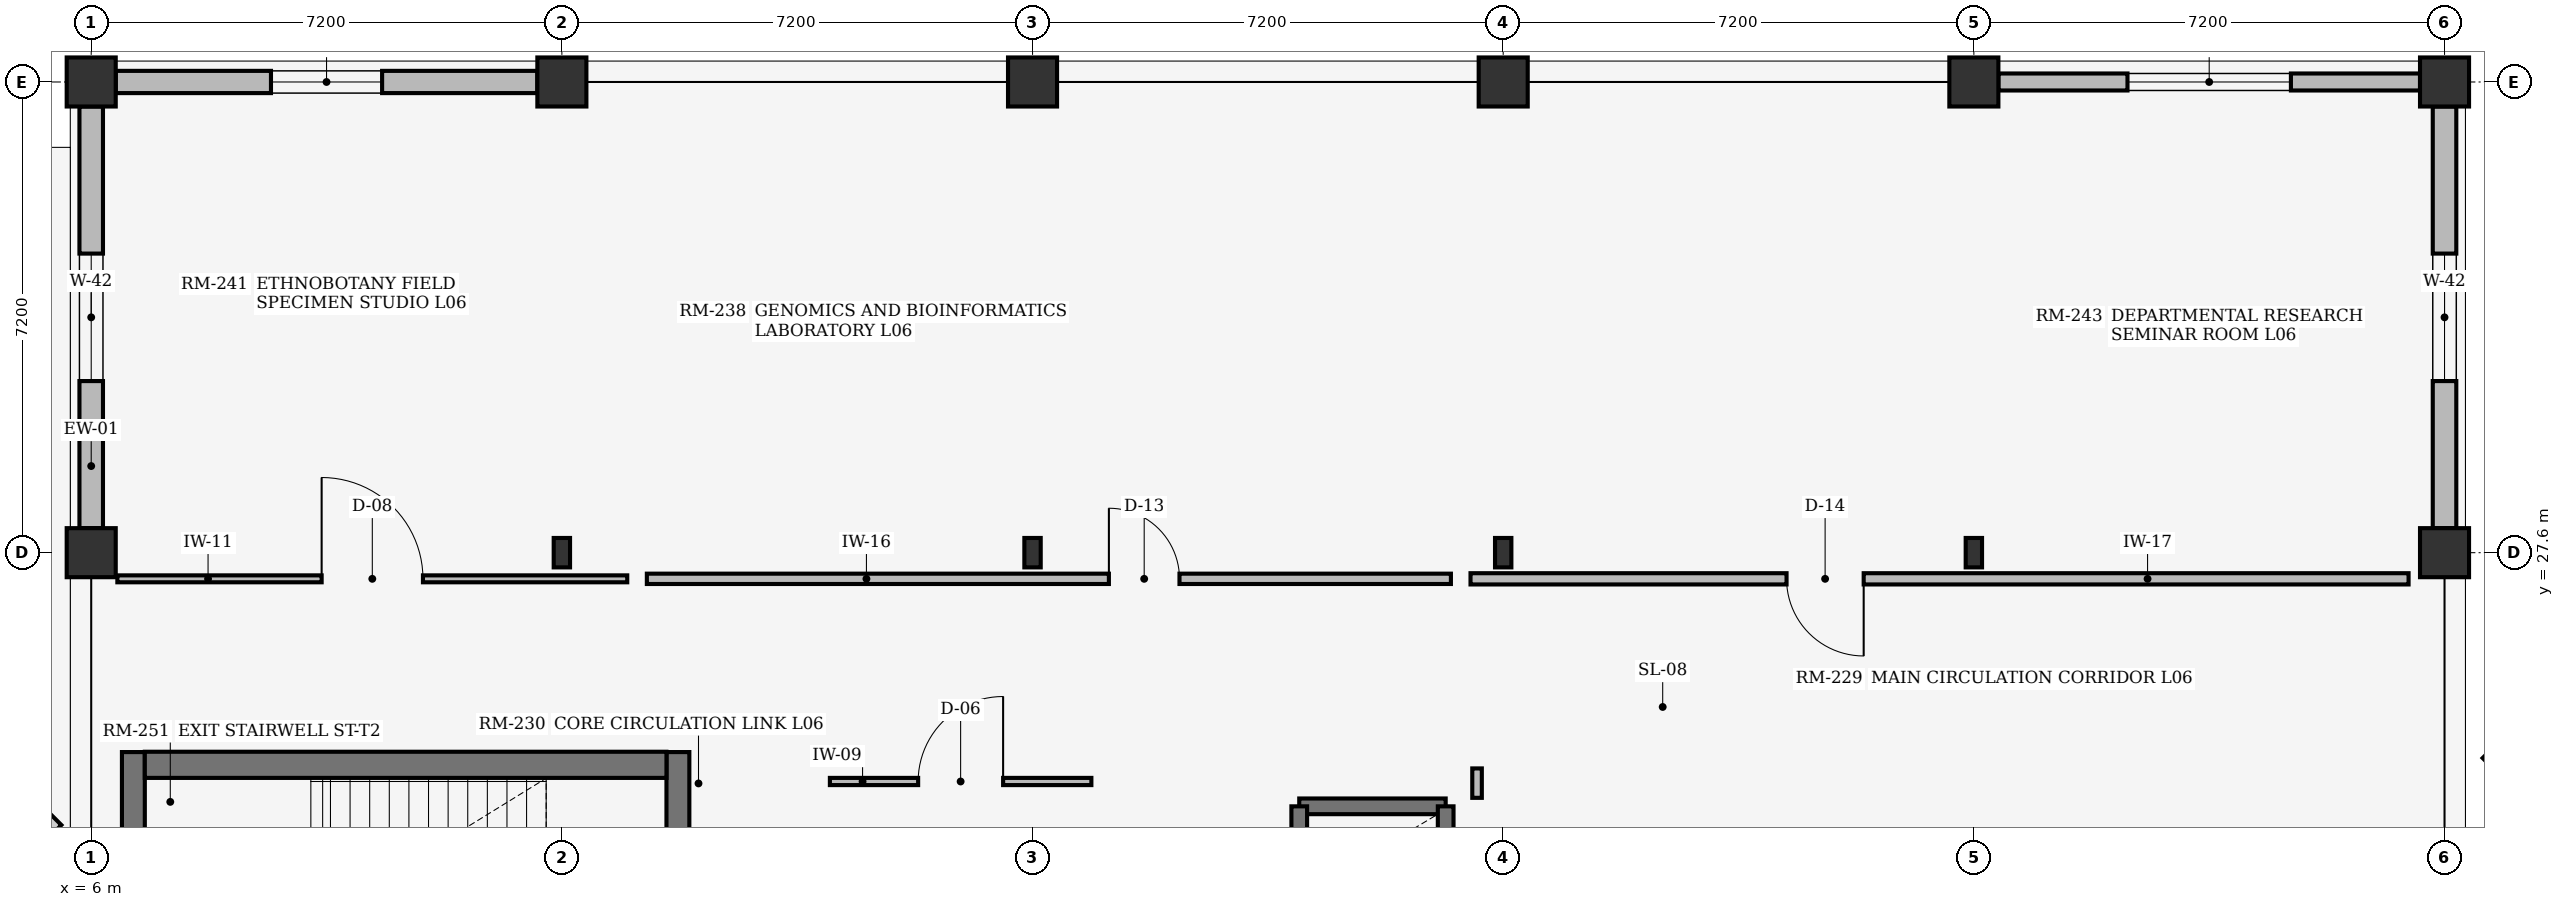
"""IFC4 building model, lengths in metres.
Left out: names, types, materials, properties, quantities, classifications, styles, units other than length and angle.
Written with IfcOpenShell. Run it as: python <this file> out.ifc"""

import sys

from ifc_helpers import new_model, si_unit, direction, frame, frame_2d, origin, origin_2d, place, context, subcontext, project, spatial, rectangle, i_section, extrude, element, fill, save


model = new_model("IFC4")
c1 = context("Model", 3, precision=1e-05, world=origin(), true_north=direction((0.0, 1.0)))
c2 = subcontext(c1, "Body", "Model", "MODEL_VIEW")
j1 = project(units=[si_unit("LENGTHUNIT", "METRE"), si_unit("PLANEANGLEUNIT", "RADIAN")], contexts=[c1])
p1 = place(None, origin())
s1 = spatial("IfcSite", under=j1, at=p1, CompositionType="ELEMENT")
p2 = place(p1, origin())
s2 = spatial("IfcBuilding", under=s1, at=p2, CompositionType="ELEMENT")
p3 = place(p2, frame((0.0, 0.0, 24.9)))
s3 = spatial("IfcBuildingStorey", under=s2, at=p3, CompositionType="ELEMENT", Elevation=24.9)
for number, where, z_axis, x_axis in (
    (1, (6.0, 27.6, 0.0), (0.0, 0.0, 1.0), (1.0, 0.0, 0.0)),
    (2, (6.0, 34.8, 0.0), (0.0, 0.0, 1.0), (1.0, 0.0, 0.0)),
):
    element("IfcColumn", number, at=place(p3, frame(where, z_axis=z_axis, x_axis=x_axis)), inside=s3, PredefinedType="COLUMN", context=c2, shape_type="SweptSolid", body=[
        extrude(rectangle(XDim=0.75, YDim=0.75, at=origin_2d()), origin(), (0.0, 0.0, 1.0), 3.65),
    ])
p4 = place(p3, frame((13.2, 27.6, 0.0), z_axis=(0.0, 0.0, 1.0), x_axis=(1.0, 0.0, 0.0)))
e3 = element("IfcColumn", 3, at=p4, inside=s3, PredefinedType="COLUMN", context=c2, shape_type="SweptSolid", body=[
    extrude(i_section(OverallWidth=0.25, OverallDepth=0.45, WebThickness=0.011, FlangeThickness=0.014, at=origin_2d()), origin(), (0.0, 0.0, 1.0), 3.65),
])
p5 = place(p3, frame((13.2, 34.8, 0.0), z_axis=(0.0, 0.0, 1.0), x_axis=(1.0, 0.0, 0.0)))
e4 = element("IfcColumn", 4, at=p5, inside=s3, PredefinedType="COLUMN", context=c2, shape_type="SweptSolid", body=[
    extrude(rectangle(XDim=0.75, YDim=0.75, at=origin_2d()), origin(), (0.0, 0.0, 1.0), 3.65),
])
p6 = place(p3, frame((20.4, 27.6, 0.0), z_axis=(0.0, 0.0, 1.0), x_axis=(1.0, 0.0, 0.0)))
e5 = element("IfcColumn", 5, at=p6, inside=s3, PredefinedType="COLUMN", context=c2, shape_type="SweptSolid", body=[
    extrude(i_section(OverallWidth=0.25, OverallDepth=0.45, WebThickness=0.011, FlangeThickness=0.014, at=origin_2d()), origin(), (0.0, 0.0, 1.0), 3.65),
])
p7 = place(p3, frame((20.4, 34.8, 0.0), z_axis=(0.0, 0.0, 1.0), x_axis=(1.0, 0.0, 0.0)))
e6 = element("IfcColumn", 6, at=p7, inside=s3, PredefinedType="COLUMN", context=c2, shape_type="SweptSolid", body=[
    extrude(rectangle(XDim=0.75, YDim=0.75, at=origin_2d()), origin(), (0.0, 0.0, 1.0), 3.65),
])
p8 = place(p3, frame((27.6, 27.6, 0.0), z_axis=(0.0, 0.0, 1.0), x_axis=(1.0, 0.0, 0.0)))
e7 = element("IfcColumn", 7, at=p8, inside=s3, PredefinedType="COLUMN", context=c2, shape_type="SweptSolid", body=[
    extrude(i_section(OverallWidth=0.25, OverallDepth=0.45, WebThickness=0.011, FlangeThickness=0.014, at=origin_2d()), origin(), (0.0, 0.0, 1.0), 3.65),
])
p9 = place(p3, frame((27.6, 34.8, 0.0), z_axis=(0.0, 0.0, 1.0), x_axis=(1.0, 0.0, 0.0)))
e8 = element("IfcColumn", 8, at=p9, inside=s3, PredefinedType="COLUMN", context=c2, shape_type="SweptSolid", body=[
    extrude(rectangle(XDim=0.75, YDim=0.75, at=origin_2d()), origin(), (0.0, 0.0, 1.0), 3.65),
])
p10 = place(p3, frame((34.8, 27.6, 0.0), z_axis=(0.0, 0.0, 1.0), x_axis=(1.0, 0.0, 0.0)))
e9 = element("IfcColumn", 9, at=p10, inside=s3, PredefinedType="COLUMN", context=c2, shape_type="SweptSolid", body=[
    extrude(i_section(OverallWidth=0.25, OverallDepth=0.45, WebThickness=0.011, FlangeThickness=0.014, at=origin_2d()), origin(), (0.0, 0.0, 1.0), 3.65),
])
for number, where, z_axis, x_axis in (
    (10, (34.8, 34.8, 0.0), (0.0, 0.0, 1.0), (1.0, 0.0, 0.0)),
    (11, (42.0, 27.6, 0.0), (0.0, 0.0, 1.0), (1.0, 0.0, 0.0)),
    (12, (42.0, 34.8, 0.0), (0.0, 0.0, 1.0), (1.0, 0.0, 0.0)),
):
    element("IfcColumn", number, at=place(p3, frame(where, z_axis=z_axis, x_axis=x_axis)), inside=s3, PredefinedType="COLUMN", context=c2, shape_type="SweptSolid", body=[
        extrude(rectangle(XDim=0.75, YDim=0.75, at=origin_2d()), origin(), (0.0, 0.0, 1.0), 3.65),
    ])
p11 = place(p3, frame((6.375, 34.8, 0.0), z_axis=(0.0, 0.0, 1.0), x_axis=(1.0, 0.0, 0.0)))
e13 = element("IfcWall", 13, at=p11, inside=s3, PredefinedType="STANDARD", context=c2, shape_type="SweptSolid", body=[
    extrude(rectangle(XDim=6.45, YDim=0.34, at=frame_2d((3.225, 0.0))), origin(), (0.0, 0.0, 1.0), 3.13),
])
p12 = place(p11, frame((2.375, 0.0, 0.75)))
e14 = element("IfcOpeningElement", 14, at=p12, cuts=e13, PredefinedType="OPENING", context=c2, shape_type="SweptSolid", body=[
    extrude(rectangle(XDim=1.7, YDim=1.35, at=frame_2d((0.85, 0.675))), frame((0.0, 0.18, 0.0), z_axis=(0.0, -1.0, 0.0), x_axis=(1.0, 0.0, 0.0)), (0.0, 0.0, 1.0), 0.36),
])
p13 = place(p3, frame((35.175, 34.8, 0.0), z_axis=(0.0, 0.0, 1.0), x_axis=(1.0, 0.0, 0.0)))
e15 = element("IfcWall", 15, at=p13, inside=s3, PredefinedType="STANDARD", context=c2, shape_type="SweptSolid", body=[
    extrude(rectangle(XDim=6.45, YDim=0.26, at=frame_2d((3.225, 0.0))), origin(), (0.0, 0.0, 1.0), 3.13),
])
p14 = place(p13, frame((1.975, 0.0, 0.75)))
e16 = element("IfcOpeningElement", 16, at=p14, cuts=e15, PredefinedType="OPENING", context=c2, shape_type="SweptSolid", body=[
    extrude(rectangle(XDim=2.5, YDim=1.35, at=frame_2d((1.25, 0.675))), frame((0.0, 0.14, 0.0), z_axis=(0.0, -1.0, 0.0), x_axis=(1.0, 0.0, 0.0)), (0.0, 0.0, 1.0), 0.28),
])
p15 = place(p3, frame((6.0, 27.975, 0.0), z_axis=(0.0, 0.0, 1.0), x_axis=(0.0, 1.0, 0.0)))
e17 = element("IfcWall", 17, at=p15, inside=s3, PredefinedType="STANDARD", context=c2, shape_type="SweptSolid", body=[
    extrude(rectangle(XDim=6.45, YDim=0.36, at=frame_2d((3.225, 0.0))), origin(), (0.0, 0.0, 1.0), 3.13),
])
p16 = place(p15, frame((2.25, 0.0, 0.75)))
e18 = element("IfcOpeningElement", 18, at=p16, cuts=e17, PredefinedType="OPENING", context=c2, shape_type="SweptSolid", body=[
    extrude(rectangle(XDim=1.95, YDim=1.5, at=frame_2d((0.975, 0.75))), frame((0.0, 0.19, 0.0), z_axis=(0.0, -1.0, 0.0), x_axis=(1.0, 0.0, 0.0)), (0.0, 0.0, 1.0), 0.38),
])
p17 = place(p3, frame((42.0, 27.975, 0.0), z_axis=(0.0, 0.0, 1.0), x_axis=(0.0, 1.0, 0.0)))
e19 = element("IfcWall", 19, at=p17, inside=s3, PredefinedType="STANDARD", context=c2, shape_type="SweptSolid", body=[
    extrude(rectangle(XDim=6.45, YDim=0.36, at=frame_2d((3.225, 0.0))), origin(), (0.0, 0.0, 1.0), 3.13),
])
p18 = place(p17, frame((2.25, 0.0, 0.75)))
e20 = element("IfcOpeningElement", 20, at=p18, cuts=e19, PredefinedType="OPENING", context=c2, shape_type="SweptSolid", body=[
    extrude(rectangle(XDim=1.95, YDim=1.5, at=frame_2d((0.975, 0.75))), frame((0.0, 0.19, 0.0), z_axis=(0.0, -1.0, 0.0), x_axis=(1.0, 0.0, 0.0)), (0.0, 0.0, 1.0), 0.38),
])
p19 = place(p3, frame((14.975, 24.55, 0.0), z_axis=(0.0, 0.0, 1.0), x_axis=(0.0, -1.0, 0.0)))
e21 = element("IfcWall", 21, at=p19, inside=s3, PredefinedType="SHEAR", context=c2, shape_type="SweptSolid", body=[
    extrude(rectangle(XDim=4.59, YDim=0.35, at=frame_2d((2.295, 0.0))), origin(), (0.0, 0.0, 1.0), 3.65),
])
p20 = place(p19, frame((1.72, 0.0, 0.0)))
e22 = element("IfcOpeningElement", 22, at=p20, cuts=e21, PredefinedType="OPENING", context=c2, shape_type="SweptSolid", body=[
    extrude(rectangle(XDim=1.15, YDim=2.2, at=frame_2d((0.575, 1.1))), frame((0.0, 0.185, 0.0), z_axis=(0.0, -1.0, 0.0), x_axis=(1.0, 0.0, 0.0)), (0.0, 0.0, 1.0), 0.37),
])
p21 = place(p3, frame((6.645, 24.55, 0.0), z_axis=(0.0, 0.0, 1.0), x_axis=(0.0, -1.0, 0.0)))
e23 = element("IfcWall", 23, at=p21, inside=s3, PredefinedType="SHEAR", context=c2, shape_type="SweptSolid", body=[
    extrude(rectangle(XDim=4.59, YDim=0.35, at=frame_2d((2.295, 0.0))), origin(), (0.0, 0.0, 1.0), 3.65),
])
p22 = place(p3, frame((14.8, 24.355, 0.0), z_axis=(0.0, 0.0, 1.0), x_axis=(-1.0, 0.0, 0.0)))
e24 = element("IfcWall", 24, at=p22, inside=s3, PredefinedType="SHEAR", context=c2, shape_type="SweptSolid", body=[
    extrude(rectangle(XDim=7.98, YDim=0.4, at=frame_2d((3.99, 0.0))), origin(), (0.0, 0.0, 1.0), 3.65),
])
p23 = place(p3, frame((24.48, 23.72, 0.0), z_axis=(0.0, 0.0, 1.0), x_axis=(1.0, 0.0, 0.0)))
e25 = element("IfcWall", 25, at=p23, inside=s3, PredefinedType="SHEAR", context=c2, shape_type="SweptSolid", body=[
    extrude(rectangle(XDim=2.24, YDim=0.24, at=frame_2d((1.12, 0.0))), origin(), (0.0, 0.0, 1.0), 3.65),
])
for number, where, z_axis, x_axis in (
    (26, (24.48, 20.78, 0.0), (0.0, 0.0, 1.0), (0.0, 1.0, 0.0)),
    (27, (26.72, 20.78, 0.0), (0.0, 0.0, 1.0), (0.0, 1.0, 0.0)),
):
    element("IfcWall", number, at=place(p3, frame(where, z_axis=z_axis, x_axis=x_axis)), inside=s3, PredefinedType="SHEAR", context=c2, shape_type="SweptSolid", body=[
        extrude(rectangle(XDim=2.94, YDim=0.24, at=frame_2d((1.47, 0.0))), origin(), (0.0, 0.0, 1.0), 3.65),
    ])
p24 = place(p3, frame((17.3, 24.1, 0.0), z_axis=(0.0, 0.0, 1.0), x_axis=(1.0, 0.0, 0.0)))
e28 = element("IfcWall", 28, at=p24, inside=s3, PredefinedType="PARTITIONING", context=c2, shape_type="SweptSolid", body=[
    extrude(rectangle(XDim=4.0, YDim=0.11, at=frame_2d((2.0, 0.0))), origin(), (0.0, 0.0, 1.0), 3.63),
])
p25 = place(p24, frame((1.35, 0.0, 0.0)))
e29 = element("IfcOpeningElement", 29, at=p25, cuts=e28, PredefinedType="OPENING", context=c2, shape_type="SweptSolid", body=[
    extrude(rectangle(XDim=1.3, YDim=2.2, at=frame_2d((0.65, 1.1))), frame((0.0, 0.065, 0.0), z_axis=(0.0, -1.0, 0.0), x_axis=(1.0, 0.0, 0.0)), (0.0, 0.0, 1.0), 0.13),
])
p26 = place(p3, frame((6.4, 27.2, 0.0), z_axis=(0.0, 0.0, 1.0), x_axis=(1.0, 0.0, 0.0)))
e30 = element("IfcWall", 30, at=p26, inside=s3, PredefinedType="PARTITIONING", context=c2, shape_type="SweptSolid", body=[
    extrude(rectangle(XDim=7.8, YDim=0.106, at=frame_2d((3.9, 0.0))), origin(), (0.0, 0.0, 1.0), 3.63),
])
p27 = place(p26, frame((3.125, 0.0, 0.0)))
e31 = element("IfcOpeningElement", 31, at=p27, cuts=e30, PredefinedType="OPENING", context=c2, shape_type="SweptSolid", body=[
    extrude(rectangle(XDim=1.55, YDim=2.25, at=frame_2d((0.775, 1.125))), frame((0.0, 0.063, 0.0), z_axis=(0.0, -1.0, 0.0), x_axis=(1.0, 0.0, 0.0)), (0.0, 0.0, 1.0), 0.126),
])
p28 = place(p3, frame((27.2, 24.3, 0.0), z_axis=(0.0, 0.0, 1.0), x_axis=(0.0, -1.0, 0.0)))
e32 = element("IfcWall", 32, at=p28, inside=s3, PredefinedType="PARTITIONING", context=c2, shape_type="SweptSolid", body=[
    extrude(rectangle(XDim=0.45, YDim=0.146, at=frame_2d((0.225, 0.0))), origin(), (0.0, 0.0, 1.0), 3.63),
])
p29 = place(p3, frame((14.5, 27.2, 0.0), z_axis=(0.0, 0.0, 1.0), x_axis=(1.0, 0.0, 0.0)))
e33 = element("IfcWall", 33, at=p29, inside=s3, PredefinedType="PARTITIONING", context=c2, shape_type="SweptSolid", body=[
    extrude(rectangle(XDim=12.3, YDim=0.158, at=frame_2d((6.15, 0.0))), origin(), (0.0, 0.0, 1.0), 3.63),
])
p30 = place(p29, frame((7.068, 0.0, 0.0)))
e34 = element("IfcOpeningElement", 34, at=p30, cuts=e33, PredefinedType="OPENING", context=c2, shape_type="SweptSolid", body=[
    extrude(rectangle(XDim=1.08, YDim=2.1, at=frame_2d((0.54, 1.05))), frame((0.0, 0.089, 0.0), z_axis=(0.0, -1.0, 0.0), x_axis=(1.0, 0.0, 0.0)), (0.0, 0.0, 1.0), 0.178),
])
p31 = place(p3, frame((27.1, 27.2, 0.0), z_axis=(0.0, 0.0, 1.0), x_axis=(1.0, 0.0, 0.0)))
e35 = element("IfcWall", 35, at=p31, inside=s3, PredefinedType="PARTITIONING", context=c2, shape_type="SweptSolid", body=[
    extrude(rectangle(XDim=14.35, YDim=0.172, at=frame_2d((7.175, 0.0))), origin(), (0.0, 0.0, 1.0), 3.63),
])
p32 = place(p31, frame((4.834, 0.0, 0.0)))
e36 = element("IfcOpeningElement", 36, at=p32, cuts=e35, PredefinedType="OPENING", context=c2, shape_type="SweptSolid", body=[
    extrude(rectangle(XDim=1.18, YDim=2.1, at=frame_2d((0.59, 1.05))), frame((0.0, 0.096, 0.0), z_axis=(0.0, -1.0, 0.0), x_axis=(1.0, 0.0, 0.0)), (0.0, 0.0, 1.0), 0.192),
])
p33 = place(p12, origin())
e37 = element("IfcWindow", 37, at=p33, inside=s3, PartitioningType="SINGLE_PANEL", PredefinedType="WINDOW", context=c2, shape_type="SweptSolid", body=[
    extrude(rectangle(XDim=1.7, YDim=1.35, at=frame_2d((0.85, 0.675))), frame((0.0, 0.03, 0.0), z_axis=(0.0, -1.0, 0.0), x_axis=(1.0, 0.0, 0.0)), (0.0, 0.0, 1.0), 0.06),
])
fill(e14, e37)
p34 = place(p14, origin())
e38 = element("IfcWindow", 38, at=p34, inside=s3, PartitioningType="SINGLE_PANEL", PredefinedType="WINDOW", context=c2, shape_type="SweptSolid", body=[
    extrude(rectangle(XDim=2.5, YDim=1.35, at=frame_2d((1.25, 0.675))), frame((0.0, 0.03, 0.0), z_axis=(0.0, -1.0, 0.0), x_axis=(1.0, 0.0, 0.0)), (0.0, 0.0, 1.0), 0.06),
])
fill(e16, e38)
p35 = place(p16, origin())
e39 = element("IfcWindow", 39, at=p35, inside=s3, PartitioningType="SINGLE_PANEL", PredefinedType="WINDOW", context=c2, shape_type="SweptSolid", body=[
    extrude(rectangle(XDim=1.95, YDim=1.5, at=frame_2d((0.975, 0.75))), frame((0.0, 0.03, 0.0), z_axis=(0.0, -1.0, 0.0), x_axis=(1.0, 0.0, 0.0)), (0.0, 0.0, 1.0), 0.06),
])
fill(e18, e39)
p36 = place(p18, origin())
e40 = element("IfcWindow", 40, at=p36, inside=s3, PartitioningType="SINGLE_PANEL", PredefinedType="WINDOW", context=c2, shape_type="SweptSolid", body=[
    extrude(rectangle(XDim=1.95, YDim=1.5, at=frame_2d((0.975, 0.75))), frame((0.0, 0.03, 0.0), z_axis=(0.0, -1.0, 0.0), x_axis=(1.0, 0.0, 0.0)), (0.0, 0.0, 1.0), 0.06),
])
fill(e20, e40)
p37 = place(p25, frame((1.3, 0.0, 0.0), z_axis=(0.0, 0.0, 1.0), x_axis=(-1.0, 0.0, 0.0)))
e41 = element("IfcDoor", 41, at=p37, inside=s3, OperationType="SINGLE_SWING_RIGHT", PredefinedType="DOOR", context=c2, shape_type="SweptSolid", body=[
    extrude(rectangle(XDim=1.3, YDim=2.2, at=frame_2d((0.65, 1.1))), frame((0.0, 0.025, 0.0), z_axis=(0.0, -1.0, 0.0), x_axis=(1.0, 0.0, 0.0)), (0.0, 0.0, 1.0), 0.05),
])
fill(e29, e41)
p38 = place(p27, origin())
e42 = element("IfcDoor", 42, at=p38, inside=s3, OperationType="DOUBLE_DOOR_SINGLE_SWING", PredefinedType="DOOR", context=c2, shape_type="SweptSolid", body=[
    extrude(rectangle(XDim=1.55, YDim=2.25, at=frame_2d((0.775, 1.125))), frame((0.0, 0.025, 0.0), z_axis=(0.0, -1.0, 0.0), x_axis=(1.0, 0.0, 0.0)), (0.0, 0.0, 1.0), 0.05),
])
fill(e31, e42)
p39 = place(p30, origin())
e43 = element("IfcDoor", 43, at=p39, inside=s3, OperationType="SINGLE_SWING_LEFT", PredefinedType="DOOR", context=c2, shape_type="SweptSolid", body=[
    extrude(rectangle(XDim=1.08, YDim=2.1, at=frame_2d((0.54, 1.05))), frame((0.0, 0.025, 0.0), z_axis=(0.0, -1.0, 0.0), x_axis=(1.0, 0.0, 0.0)), (0.0, 0.0, 1.0), 0.05),
])
fill(e34, e43)
p40 = place(p32, origin())
e44 = element("IfcDoor", 44, at=p40, inside=s3, OperationType="SINGLE_SWING_RIGHT", PredefinedType="DOOR", context=c2, shape_type="SweptSolid", body=[
    extrude(rectangle(XDim=1.18, YDim=2.1, at=frame_2d((0.59, 1.05))), frame((0.0, 0.025, 0.0), z_axis=(0.0, -1.0, 0.0), x_axis=(1.0, 0.0, 0.0)), (0.0, 0.0, 1.0), 0.05),
])
fill(e36, e44)
save(model, sys.argv[1])
